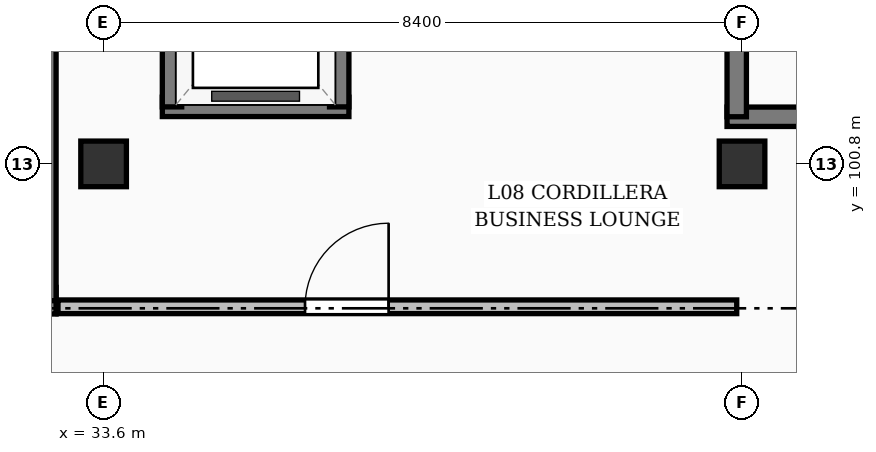
"""IFC4 building model, lengths in metres.
Left out: names, types, materials, properties, quantities, classifications, styles, units other than length and angle.
Written with IfcOpenShell. Run it as: python <this file> out.ifc"""

import sys

from ifc_helpers import new_model, si_unit, direction, frame, frame_2d, origin, origin_2d, place, context, subcontext, project, spatial, rectangle, extrude, element, fill, save


model = new_model("IFC4")
c1 = context("Model", 3, precision=1e-05, world=origin(), true_north=direction((0.0, 1.0)))
c2 = subcontext(c1, "Body", "Model", "MODEL_VIEW")
j1 = project(units=[si_unit("LENGTHUNIT", "METRE"), si_unit("PLANEANGLEUNIT", "RADIAN")], contexts=[c1])
p1 = place(None, origin())
s1 = spatial("IfcSite", under=j1, at=p1, CompositionType="ELEMENT")
p2 = place(p1, origin())
s2 = spatial("IfcBuilding", under=s1, at=p2, CompositionType="ELEMENT")
p3 = place(p2, frame((0.0, 0.0, 28.56)))
s3 = spatial("IfcBuildingStorey", under=s2, at=p3, CompositionType="ELEMENT", Elevation=28.56)
for number, where, z_axis, x_axis in (
    (1, (33.6, 100.8, 0.0), (0.0, 0.0, 1.0), (1.0, 0.0, 0.0)),
    (2, (42.0, 100.8, 0.0), (0.0, 0.0, 1.0), (1.0, 0.0, 0.0)),
):
    element("IfcColumn", number, at=place(p3, frame(where, z_axis=z_axis, x_axis=x_axis)), inside=s3, PredefinedType="COLUMN", context=c2, shape_type="SweptSolid", body=[
        extrude(rectangle(XDim=0.6, YDim=0.6, at=origin_2d()), origin(), (0.0, 0.0, 1.0), 3.36),
    ])
p4 = place(p3, frame((26.425, 99.0, 0.0), z_axis=(0.0, 0.0, 1.0), x_axis=(1.0, 0.0, 0.0)))
e3 = element("IfcWall", 3, at=p4, inside=s3, PredefinedType="SHEAR", context=c2, shape_type="SweptSolid", body=[
    extrude(rectangle(XDim=6.55, YDim=0.35, at=frame_2d((3.275, 0.0))), origin(), (0.0, 0.0, 1.0), 3.12),
])
p5 = place(p3, frame((32.8, 99.0, 0.0), z_axis=(0.0, 0.0, 1.0), x_axis=(0.0, 1.0, 0.0)))
e4 = element("IfcWall", 4, at=p5, inside=s3, PredefinedType="SHEAR", context=c2, shape_type="SweptSolid", body=[
    extrude(rectangle(XDim=6.15, YDim=0.35, at=frame_2d((3.075, 0.0))), origin(), (0.0, 0.0, 1.0), 3.12),
])
p6 = place(p3, frame((41.802, 101.42, 0.0), z_axis=(0.0, 0.0, 1.0), x_axis=(1.0, 0.0, 0.0)))
e5 = element("IfcWall", 5, at=p6, inside=s3, PredefinedType="SOLIDWALL", context=c2, shape_type="SweptSolid", body=[
    extrude(rectangle(XDim=8.225, YDim=0.255, at=frame_2d((4.113, 0.0))), origin(), (0.0, 0.0, 1.0), 3.12),
])
p7 = place(p3, frame((41.93, 101.42, 0.0), z_axis=(0.0, 0.0, 1.0), x_axis=(0.0, 1.0, 0.0)))
e6 = element("IfcWall", 6, at=p7, inside=s3, PredefinedType="SOLIDWALL", context=c2, shape_type="SweptSolid", body=[
    extrude(rectangle(XDim=3.63, YDim=0.255, at=frame_2d((1.815, 0.0))), origin(), (0.0, 0.0, 1.0), 3.12),
])
p8 = place(p3, frame((34.373, 101.55, 0.0), z_axis=(0.0, 0.0, 1.0), x_axis=(1.0, 0.0, 0.0)))
e7 = element("IfcWall", 7, at=p8, inside=s3, PredefinedType="SOLIDWALL", context=c2, shape_type="SweptSolid", body=[
    extrude(rectangle(XDim=2.455, YDim=0.255, at=frame_2d((1.228, 0.0))), origin(), (0.0, 0.0, 1.0), 3.12),
])
for number, where, z_axis, x_axis in (
    (8, (34.5, 101.55, 0.0), (0.0, 0.0, 1.0), (0.0, 1.0, 0.0)),
    (9, (36.7, 101.55, 0.0), (0.0, 0.0, 1.0), (0.0, 1.0, 0.0)),
):
    element("IfcWall", number, at=place(p3, frame(where, z_axis=z_axis, x_axis=x_axis)), inside=s3, PredefinedType="SOLIDWALL", context=c2, shape_type="SweptSolid", body=[
        extrude(rectangle(XDim=2.6, YDim=0.255, at=frame_2d((1.3, 0.0))), origin(), (0.0, 0.0, 1.0), 3.12),
    ])
p9 = place(p3, frame((33.0, 98.92, 0.0), z_axis=(0.0, 0.0, 1.0), x_axis=(1.0, 0.0, 0.0)))
e10 = element("IfcWall", 10, at=p9, inside=s3, PredefinedType="PARTITIONING", context=c2, shape_type="SweptSolid", body=[
    extrude(rectangle(XDim=8.93, YDim=0.18, at=frame_2d((4.465, 0.0))), origin(), (0.0, 0.0, 1.0), 3.12),
])
p10 = place(p9, frame((3.25, 0.0, 0.0)))
e11 = element("IfcOpeningElement", 11, at=p10, cuts=e10, PredefinedType="OPENING", context=c2, shape_type="SweptSolid", body=[
    extrude(rectangle(XDim=1.1, YDim=2.1, at=frame_2d((0.55, 1.05))), frame((0.0, 0.1, 0.0), z_axis=(0.0, -1.0, 0.0), x_axis=(1.0, 0.0, 0.0)), (0.0, 0.0, 1.0), 0.2),
])
p11 = place(p10, origin())
e12 = element("IfcDoor", 12, at=p11, inside=s3, OperationType="SINGLE_SWING_RIGHT", PredefinedType="DOOR", context=c2, shape_type="SweptSolid", body=[
    extrude(rectangle(XDim=1.1, YDim=2.1, at=frame_2d((0.55, 1.05))), frame((0.0, 0.025, 0.0), z_axis=(0.0, -1.0, 0.0), x_axis=(1.0, 0.0, 0.0)), (0.0, 0.0, 1.0), 0.05),
])
fill(e11, e12)
save(model, sys.argv[1])
